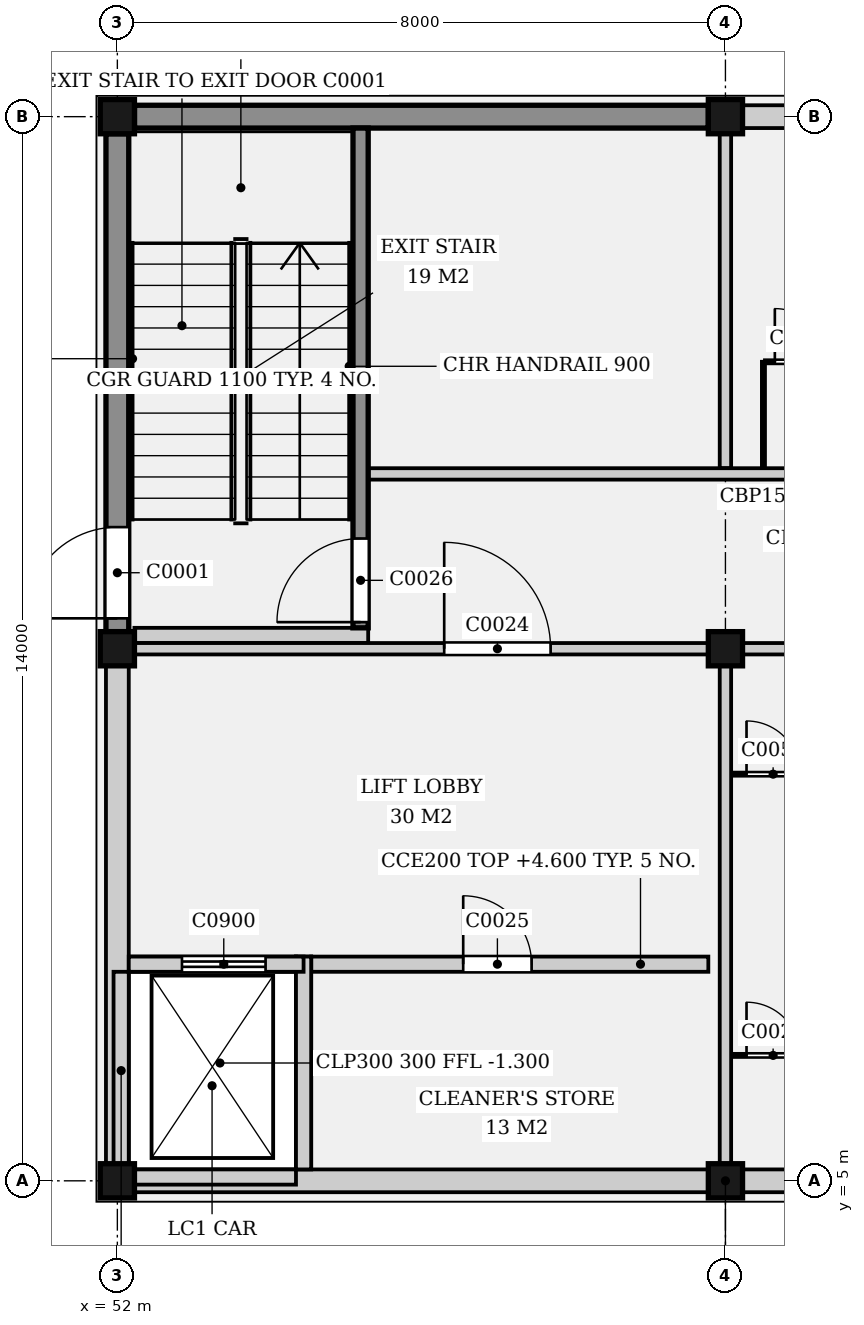
"""IFC4 building model, lengths in metres.
Left out: names, types, materials, properties, quantities, classifications, styles, units other than length and angle.
Written with IfcOpenShell. Run it as: python <this file> out.ifc"""

import sys

from ifc_helpers import new_model, si_unit, direction, frame, frame_2d, origin, origin_2d, place, context, subcontext, project, spatial, rectangle, extrude, element, fill, save


model = new_model("IFC4")
c1 = context("Model", 3, precision=1e-05, world=origin(), true_north=direction((0.0, 1.0)))
c2 = subcontext(c1, "Body", "Model", "MODEL_VIEW")
j1 = project(units=[si_unit("LENGTHUNIT", "METRE"), si_unit("PLANEANGLEUNIT", "RADIAN")], contexts=[c1])
p1 = place(None, origin())
s1 = spatial("IfcSite", under=j1, at=p1, CompositionType="ELEMENT")
p2 = place(p1, origin())
s2 = spatial("IfcBuilding", under=s1, at=p2, CompositionType="ELEMENT")
p3 = place(p2, origin())
s3 = spatial("IfcBuildingStorey", under=s2, at=p3, CompositionType="ELEMENT", Elevation=0.0)
for number, where, z_axis, x_axis in (
    (1, (52.0, 5.0, -0.25), (0.0, 0.0, 1.0), (1.0, 0.0, 0.0)),
    (2, (52.0, 12.0, -0.25), (0.0, 0.0, 1.0), (1.0, 0.0, 0.0)),
    (3, (52.0, 19.0, -0.25), (0.0, 0.0, 1.0), (1.0, 0.0, 0.0)),
    (4, (60.0, 5.0, -0.25), (0.0, 0.0, 1.0), (1.0, 0.0, 0.0)),
    (5, (60.0, 12.0, -0.25), (0.0, 0.0, 1.0), (1.0, 0.0, 0.0)),
    (6, (60.0, 19.0, -0.25), (0.0, 0.0, 1.0), (1.0, 0.0, 0.0)),
):
    element("IfcColumn", number, at=place(p3, frame(where, z_axis=z_axis, x_axis=x_axis)), inside=s3, PredefinedType="COLUMN", context=c2, shape_type="SweptSolid", body=[
        extrude(rectangle(XDim=0.45, YDim=0.45, at=origin_2d()), origin(), (0.0, 0.0, 1.0), 5.25),
    ])
p4 = place(p3, frame((52.225, 5.0, 0.0), z_axis=(0.0, 0.0, 1.0), x_axis=(1.0, 0.0, 0.0)))
e7 = element("IfcWall", 7, at=p4, inside=s3, PredefinedType="ELEMENTEDWALL", context=c2, shape_type="SweptSolid", body=[
    extrude(rectangle(XDim=7.55, YDim=0.3, at=frame_2d((3.775, 0.0))), origin(), (0.0, 0.0, 1.0), 4.6),
])
p5 = place(p3, frame((60.225, 5.0, 0.0), z_axis=(0.0, 0.0, 1.0), x_axis=(1.0, 0.0, 0.0)))
e8 = element("IfcWall", 8, at=p5, inside=s3, PredefinedType="ELEMENTEDWALL", context=c2, shape_type="SweptSolid", body=[
    extrude(rectangle(XDim=11.55, YDim=0.3, at=frame_2d((5.775, 0.0))), origin(), (0.0, 0.0, 1.0), 4.6),
])
p6 = place(p5, frame((1.458, 0.0, 2.5)))
e9 = element("IfcOpeningElement", 9, at=p6, cuts=e8, PredefinedType="OPENING", context=c2, shape_type="SweptSolid", body=[
    extrude(rectangle(XDim=1.6, YDim=1.0, at=frame_2d((0.8, 0.5))), frame((0.0, 0.16, 0.0), z_axis=(0.0, -1.0, 0.0), x_axis=(1.0, 0.0, 0.0)), (0.0, 0.0, 1.0), 0.32),
])
p7 = place(p5, frame((4.975, 0.0, 2.5)))
e10 = element("IfcOpeningElement", 10, at=p7, cuts=e8, PredefinedType="OPENING", context=c2, shape_type="SweptSolid", body=[
    extrude(rectangle(XDim=1.6, YDim=1.0, at=frame_2d((0.8, 0.5))), frame((0.0, 0.16, 0.0), z_axis=(0.0, -1.0, 0.0), x_axis=(1.0, 0.0, 0.0)), (0.0, 0.0, 1.0), 0.32),
])
p8 = place(p5, frame((8.492, 0.0, 2.5)))
e11 = element("IfcOpeningElement", 11, at=p8, cuts=e8, PredefinedType="OPENING", context=c2, shape_type="SweptSolid", body=[
    extrude(rectangle(XDim=1.6, YDim=1.0, at=frame_2d((0.8, 0.5))), frame((0.0, 0.16, 0.0), z_axis=(0.0, -1.0, 0.0), x_axis=(1.0, 0.0, 0.0)), (0.0, 0.0, 1.0), 0.32),
])
p9 = place(p3, frame((52.225, 19.0, 0.0), z_axis=(0.0, 0.0, 1.0), x_axis=(1.0, 0.0, 0.0)))
e12 = element("IfcWall", 12, at=p9, inside=s3, PredefinedType="ELEMENTEDWALL", context=c2, shape_type="SweptSolid", body=[
    extrude(rectangle(XDim=7.55, YDim=0.3, at=frame_2d((3.775, 0.0))), origin(), (0.0, 0.0, 1.0), 4.6),
])
p10 = place(p3, frame((60.225, 19.0, 0.0), z_axis=(0.0, 0.0, 1.0), x_axis=(1.0, 0.0, 0.0)))
e13 = element("IfcWall", 13, at=p10, inside=s3, PredefinedType="ELEMENTEDWALL", context=c2, shape_type="SweptSolid", body=[
    extrude(rectangle(XDim=11.55, YDim=0.3, at=frame_2d((5.775, 0.0))), origin(), (0.0, 0.0, 1.0), 4.6),
])
p11 = place(p10, frame((1.458, 0.0, 2.5)))
e14 = element("IfcOpeningElement", 14, at=p11, cuts=e13, PredefinedType="OPENING", context=c2, shape_type="SweptSolid", body=[
    extrude(rectangle(XDim=1.6, YDim=1.0, at=frame_2d((0.8, 0.5))), frame((0.0, 0.16, 0.0), z_axis=(0.0, -1.0, 0.0), x_axis=(1.0, 0.0, 0.0)), (0.0, 0.0, 1.0), 0.32),
])
p12 = place(p10, frame((4.975, 0.0, 2.5)))
e15 = element("IfcOpeningElement", 15, at=p12, cuts=e13, PredefinedType="OPENING", context=c2, shape_type="SweptSolid", body=[
    extrude(rectangle(XDim=1.6, YDim=1.0, at=frame_2d((0.8, 0.5))), frame((0.0, 0.16, 0.0), z_axis=(0.0, -1.0, 0.0), x_axis=(1.0, 0.0, 0.0)), (0.0, 0.0, 1.0), 0.32),
])
p13 = place(p10, frame((8.492, 0.0, 2.5)))
e16 = element("IfcOpeningElement", 16, at=p13, cuts=e13, PredefinedType="OPENING", context=c2, shape_type="SweptSolid", body=[
    extrude(rectangle(XDim=1.6, YDim=1.0, at=frame_2d((0.8, 0.5))), frame((0.0, 0.16, 0.0), z_axis=(0.0, -1.0, 0.0), x_axis=(1.0, 0.0, 0.0)), (0.0, 0.0, 1.0), 0.32),
])
p14 = place(p3, frame((52.0, 5.225, 0.0), z_axis=(0.0, 0.0, 1.0), x_axis=(0.0, 1.0, 0.0)))
e17 = element("IfcWall", 17, at=p14, inside=s3, PredefinedType="ELEMENTEDWALL", context=c2, shape_type="SweptSolid", body=[
    extrude(rectangle(XDim=6.55, YDim=0.3, at=frame_2d((3.275, 0.0))), origin(), (0.0, 0.0, 1.0), 4.6),
])
p15 = place(p3, frame((52.0, 12.225, 0.0), z_axis=(0.0, 0.0, 1.0), x_axis=(0.0, 1.0, 0.0)))
e18 = element("IfcWall", 18, at=p15, inside=s3, PredefinedType="ELEMENTEDWALL", context=c2, shape_type="SweptSolid", body=[
    extrude(rectangle(XDim=6.55, YDim=0.3, at=frame_2d((3.275, 0.0))), origin(), (0.0, 0.0, 1.0), 4.6),
])
p16 = place(p15, frame((0.175, 0.0, 0.0)))
e19 = element("IfcOpeningElement", 19, at=p16, cuts=e18, PredefinedType="OPENING", context=c2, shape_type="SweptSolid", body=[
    extrude(rectangle(XDim=1.2, YDim=2.1, at=frame_2d((0.6, 1.05))), frame((0.0, 0.16, 0.0), z_axis=(0.0, -1.0, 0.0), x_axis=(1.0, 0.0, 0.0)), (0.0, 0.0, 1.0), 0.32),
])
p17 = place(p3, frame((52.15, 7.85, -1.3), z_axis=(0.0, 0.0, 1.0), x_axis=(1.0, 0.0, 0.0)))
e20 = element("IfcWall", 20, at=p17, inside=s3, PredefinedType="SOLIDWALL", context=c2, shape_type="SweptSolid", body=[
    extrude(rectangle(XDim=2.3, YDim=0.2, at=frame_2d((1.15, 0.0))), origin(), (0.0, 0.0, 1.0), 1.3),
])
p18 = place(p3, frame((54.45, 5.15, -1.3), z_axis=(0.0, 0.0, 1.0), x_axis=(0.0, 1.0, 0.0)))
e21 = element("IfcWall", 21, at=p18, inside=s3, PredefinedType="SOLIDWALL", context=c2, shape_type="SweptSolid", body=[
    extrude(rectangle(XDim=2.8, YDim=0.2, at=frame_2d((1.4, 0.0))), origin(), (0.0, 0.0, 1.0), 1.3),
])
p19 = place(p3, frame((52.05, 5.15, -1.3), z_axis=(0.0, 0.0, 1.0), x_axis=(0.0, 1.0, 0.0)))
e22 = element("IfcWall", 22, at=p19, inside=s3, PredefinedType="SOLIDWALL", context=c2, shape_type="SweptSolid", body=[
    extrude(rectangle(XDim=2.6, YDim=0.2, at=frame_2d((1.3, 0.0))), origin(), (0.0, 0.0, 1.0), 1.3),
])
p20 = place(p3, frame((52.15, 5.05, -1.3), z_axis=(0.0, 0.0, 1.0), x_axis=(1.0, 0.0, 0.0)))
e23 = element("IfcWall", 23, at=p20, inside=s3, PredefinedType="SOLIDWALL", context=c2, shape_type="SweptSolid", body=[
    extrude(rectangle(XDim=2.2, YDim=0.2, at=frame_2d((1.1, 0.0))), origin(), (0.0, 0.0, 1.0), 1.3),
])
p21 = place(p3, frame((54.45, 5.15, 0.0), z_axis=(0.0, 0.0, 1.0), x_axis=(0.0, 1.0, 0.0)))
e24 = element("IfcWall", 24, at=p21, inside=s3, PredefinedType="SOLIDWALL", context=c2, shape_type="SweptSolid", body=[
    extrude(rectangle(XDim=2.8, YDim=0.2, at=frame_2d((1.4, 0.0))), origin(), (0.0, 0.0, 1.0), 4.6),
])
p22 = place(p3, frame((52.15, 7.85, 0.0), z_axis=(0.0, 0.0, 1.0), x_axis=(1.0, 0.0, 0.0)))
e25 = element("IfcWall", 25, at=p22, inside=s3, PredefinedType="SOLIDWALL", context=c2, shape_type="SweptSolid", body=[
    extrude(rectangle(XDim=2.2, YDim=0.2, at=frame_2d((1.1, 0.0))), origin(), (0.0, 0.0, 1.0), 4.6),
])
p23 = place(p22, frame((0.7, 0.0, 0.0)))
e26 = element("IfcOpeningElement", 26, at=p23, cuts=e25, PredefinedType="OPENING", context=c2, shape_type="SweptSolid", body=[
    extrude(rectangle(XDim=1.1, YDim=2.1, at=frame_2d((0.55, 1.05))), frame((0.0, 0.11, 0.0), z_axis=(0.0, -1.0, 0.0), x_axis=(1.0, 0.0, 0.0)), (0.0, 0.0, 1.0), 0.22),
])
p24 = place(p3, frame((52.225, 12.0, 0.0), z_axis=(0.0, 0.0, 1.0), x_axis=(1.0, 0.0, 0.0)))
e27 = element("IfcWall", 27, at=p24, inside=s3, PredefinedType="PARTITIONING", context=c2, shape_type="SweptSolid", body=[
    extrude(rectangle(XDim=7.55, YDim=0.15, at=frame_2d((3.775, 0.0))), origin(), (0.0, 0.0, 1.0), 4.6),
])
p25 = place(p24, frame((4.075, 0.0, 0.0)))
e28 = element("IfcOpeningElement", 28, at=p25, cuts=e27, PredefinedType="OPENING", context=c2, shape_type="SweptSolid", body=[
    extrude(rectangle(XDim=1.4, YDim=2.1, at=frame_2d((0.7, 1.05))), frame((0.0, 0.085, 0.0), z_axis=(0.0, -1.0, 0.0), x_axis=(1.0, 0.0, 0.0)), (0.0, 0.0, 1.0), 0.17),
])
p26 = place(p3, frame((60.225, 12.0, 0.0), z_axis=(0.0, 0.0, 1.0), x_axis=(1.0, 0.0, 0.0)))
e29 = element("IfcWall", 29, at=p26, inside=s3, PredefinedType="PARTITIONING", context=c2, shape_type="SweptSolid", body=[
    extrude(rectangle(XDim=11.55, YDim=0.15, at=frame_2d((5.775, 0.0))), origin(), (0.0, 0.0, 1.0), 4.6),
])
p27 = place(p3, frame((55.3, 14.3, 0.0), z_axis=(0.0, 0.0, 1.0), x_axis=(1.0, 0.0, 0.0)))
e30 = element("IfcWall", 30, at=p27, inside=s3, PredefinedType="PARTITIONING", context=c2, shape_type="SweptSolid", body=[
    extrude(rectangle(XDim=93.4, YDim=0.15, at=frame_2d((46.7, 0.0))), origin(), (0.0, 0.0, 1.0), 4.6),
])
p28 = place(p27, frame((15.8, 0.0, 0.0)))
e31 = element("IfcOpeningElement", 31, at=p28, cuts=e30, PredefinedType="OPENING", context=c2, shape_type="SweptSolid", body=[
    extrude(rectangle(XDim=1.8, YDim=2.4, at=frame_2d((0.9, 1.2))), frame((0.0, 0.085, 0.0), z_axis=(0.0, -1.0, 0.0), x_axis=(1.0, 0.0, 0.0)), (0.0, 0.0, 1.0), 0.17),
])
p29 = place(p27, frame((32.2, 0.0, 0.0)))
e32 = element("IfcOpeningElement", 32, at=p29, cuts=e30, PredefinedType="OPENING", context=c2, shape_type="SweptSolid", body=[
    extrude(rectangle(XDim=1.0, YDim=2.1, at=frame_2d((0.5, 1.05))), frame((0.0, 0.085, 0.0), z_axis=(0.0, -1.0, 0.0), x_axis=(1.0, 0.0, 0.0)), (0.0, 0.0, 1.0), 0.17),
])
p30 = place(p27, frame((38.2, 0.0, 0.0)))
e33 = element("IfcOpeningElement", 33, at=p30, cuts=e30, PredefinedType="OPENING", context=c2, shape_type="SweptSolid", body=[
    extrude(rectangle(XDim=1.0, YDim=2.1, at=frame_2d((0.5, 1.05))), frame((0.0, 0.085, 0.0), z_axis=(0.0, -1.0, 0.0), x_axis=(1.0, 0.0, 0.0)), (0.0, 0.0, 1.0), 0.17),
])
p31 = place(p27, frame((43.2, 0.0, 0.0)))
e34 = element("IfcOpeningElement", 34, at=p31, cuts=e30, PredefinedType="OPENING", context=c2, shape_type="SweptSolid", body=[
    extrude(rectangle(XDim=1.0, YDim=2.1, at=frame_2d((0.5, 1.05))), frame((0.0, 0.085, 0.0), z_axis=(0.0, -1.0, 0.0), x_axis=(1.0, 0.0, 0.0)), (0.0, 0.0, 1.0), 0.17),
])
p32 = place(p27, frame((49.2, 0.0, 0.0)))
e35 = element("IfcOpeningElement", 35, at=p32, cuts=e30, PredefinedType="OPENING", context=c2, shape_type="SweptSolid", body=[
    extrude(rectangle(XDim=1.0, YDim=2.1, at=frame_2d((0.5, 1.05))), frame((0.0, 0.085, 0.0), z_axis=(0.0, -1.0, 0.0), x_axis=(1.0, 0.0, 0.0)), (0.0, 0.0, 1.0), 0.17),
])
p33 = place(p27, frame((57.8, 0.0, 0.0)))
e36 = element("IfcOpeningElement", 36, at=p33, cuts=e30, PredefinedType="OPENING", context=c2, shape_type="SweptSolid", body=[
    extrude(rectangle(XDim=1.8, YDim=2.4, at=frame_2d((0.9, 1.2))), frame((0.0, 0.085, 0.0), z_axis=(0.0, -1.0, 0.0), x_axis=(1.0, 0.0, 0.0)), (0.0, 0.0, 1.0), 0.17),
])
p34 = place(p27, frame((69.8, 0.0, 0.0)))
e37 = element("IfcOpeningElement", 37, at=p34, cuts=e30, PredefinedType="OPENING", context=c2, shape_type="SweptSolid", body=[
    extrude(rectangle(XDim=1.8, YDim=2.4, at=frame_2d((0.9, 1.2))), frame((0.0, 0.085, 0.0), z_axis=(0.0, -1.0, 0.0), x_axis=(1.0, 0.0, 0.0)), (0.0, 0.0, 1.0), 0.17),
])
p35 = place(p27, frame((82.2, 0.0, 0.0)))
e38 = element("IfcOpeningElement", 38, at=p35, cuts=e30, PredefinedType="OPENING", context=c2, shape_type="SweptSolid", body=[
    extrude(rectangle(XDim=1.0, YDim=2.1, at=frame_2d((0.5, 1.05))), frame((0.0, 0.085, 0.0), z_axis=(0.0, -1.0, 0.0), x_axis=(1.0, 0.0, 0.0)), (0.0, 0.0, 1.0), 0.17),
])
p36 = place(p3, frame((60.0, 5.225, 0.0), z_axis=(0.0, 0.0, 1.0), x_axis=(0.0, 1.0, 0.0)))
e39 = element("IfcWall", 39, at=p36, inside=s3, PredefinedType="PARTITIONING", context=c2, shape_type="SweptSolid", body=[
    extrude(rectangle(XDim=6.55, YDim=0.15, at=frame_2d((3.275, 0.0))), origin(), (0.0, 0.0, 1.0), 4.6),
])
p37 = place(p3, frame((60.0, 14.375, 0.0), z_axis=(0.0, 0.0, 1.0), x_axis=(0.0, 1.0, 0.0)))
e40 = element("IfcWall", 40, at=p37, inside=s3, PredefinedType="PARTITIONING", context=c2, shape_type="SweptSolid", body=[
    extrude(rectangle(XDim=4.4, YDim=0.15, at=frame_2d((2.2, 0.0))), origin(), (0.0, 0.0, 1.0), 4.6),
])
p38 = place(p3, frame((54.55, 7.85, 0.0), z_axis=(0.0, 0.0, 1.0), x_axis=(1.0, 0.0, 0.0)))
e41 = element("IfcWall", 41, at=p38, inside=s3, PredefinedType="SOLIDWALL", context=c2, shape_type="SweptSolid", body=[
    extrude(rectangle(XDim=5.225, YDim=0.2, at=frame_2d((2.612, 0.0))), origin(), (0.0, 0.0, 1.0), 4.6),
])
p39 = place(p38, frame((2.0, 0.0, 0.0)))
e42 = element("IfcOpeningElement", 42, at=p39, cuts=e41, PredefinedType="OPENING", context=c2, shape_type="SweptSolid", body=[
    extrude(rectangle(XDim=0.9, YDim=2.1, at=frame_2d((0.45, 1.05))), frame((0.0, 0.11, 0.0), z_axis=(0.0, -1.0, 0.0), x_axis=(1.0, 0.0, 0.0)), (0.0, 0.0, 1.0), 0.22),
])
p40 = place(p3, frame((55.2, 12.275, 0.0), z_axis=(0.0, 0.0, 1.0), x_axis=(0.0, 1.0, 0.0)))
e43 = element("IfcWall", 43, at=p40, inside=s3, PredefinedType="SOLIDWALL", context=c2, shape_type="SweptSolid", body=[
    extrude(rectangle(XDim=6.575, YDim=0.2, at=frame_2d((3.288, 0.0))), origin(), (0.0, 0.0, 1.0), 4.6),
])
p41 = place(p40, frame((0.075, 0.0, 0.0)))
e44 = element("IfcOpeningElement", 44, at=p41, cuts=e43, PredefinedType="OPENING", context=c2, shape_type="SweptSolid", body=[
    extrude(rectangle(XDim=1.1, YDim=2.1, at=frame_2d((0.55, 1.05))), frame((0.0, 0.11, 0.0), z_axis=(0.0, -1.0, 0.0), x_axis=(1.0, 0.0, 0.0)), (0.0, 0.0, 1.0), 0.22),
])
p42 = place(p3, frame((52.225, 12.175, 0.0), z_axis=(0.0, 0.0, 1.0), x_axis=(1.0, 0.0, 0.0)))
e45 = element("IfcWall", 45, at=p42, inside=s3, PredefinedType="SOLIDWALL", context=c2, shape_type="SweptSolid", body=[
    extrude(rectangle(XDim=3.075, YDim=0.2, at=frame_2d((1.538, 0.0))), origin(), (0.0, 0.0, 1.0), 4.6),
])
p43 = place(p3, frame((60.075, 6.65, 0.0), z_axis=(0.0, 0.0, 1.0), x_axis=(1.0, 0.0, 0.0)))
e46 = element("IfcWall", 46, at=p43, inside=s3, PredefinedType="PARTITIONING", context=c2, shape_type="SweptSolid", body=[
    extrude(rectangle(XDim=1.105, YDim=0.04, at=frame_2d((0.552, 0.0))), origin(), (0.0, 0.0, 1.0), 2.4),
])
p44 = place(p43, frame((0.202, 0.0, 0.0)))
e47 = element("IfcOpeningElement", 47, at=p44, cuts=e46, PredefinedType="OPENING", context=c2, shape_type="SweptSolid", body=[
    extrude(rectangle(XDim=0.7, YDim=2.0, at=frame_2d((0.35, 1.0))), frame((0.0, 0.03, 0.0), z_axis=(0.0, -1.0, 0.0), x_axis=(1.0, 0.0, 0.0)), (0.0, 0.0, 1.0), 0.06),
])
p45 = place(p3, frame((60.075, 10.35, 0.0), z_axis=(0.0, 0.0, 1.0), x_axis=(1.0, 0.0, 0.0)))
e48 = element("IfcWall", 48, at=p45, inside=s3, PredefinedType="PARTITIONING", context=c2, shape_type="SweptSolid", body=[
    extrude(rectangle(XDim=1.105, YDim=0.04, at=frame_2d((0.552, 0.0))), origin(), (0.0, 0.0, 1.0), 2.4),
])
p46 = place(p45, frame((0.202, 0.0, 0.0)))
e49 = element("IfcOpeningElement", 49, at=p46, cuts=e48, PredefinedType="OPENING", context=c2, shape_type="SweptSolid", body=[
    extrude(rectangle(XDim=0.7, YDim=2.0, at=frame_2d((0.35, 1.0))), frame((0.0, 0.03, 0.0), z_axis=(0.0, -1.0, 0.0), x_axis=(1.0, 0.0, 0.0)), (0.0, 0.0, 1.0), 0.06),
])
p47 = place(p3, frame((60.5, 14.375, 0.0), z_axis=(0.0, 0.0, 1.0), x_axis=(0.0, 1.0, 0.0)))
e50 = element("IfcWall", 50, at=p47, inside=s3, PredefinedType="PARTITIONING", context=c2, shape_type="SweptSolid", body=[
    extrude(rectangle(XDim=1.4, YDim=0.04, at=frame_2d((0.7, 0.0))), origin(), (0.0, 0.0, 1.0), 2.4),
])
p48 = place(p3, frame((60.52, 15.775, 0.0), z_axis=(0.0, 0.0, 1.0), x_axis=(1.0, 0.0, 0.0)))
e51 = element("IfcWall", 51, at=p48, inside=s3, PredefinedType="PARTITIONING", context=c2, shape_type="SweptSolid", body=[
    extrude(rectangle(XDim=0.96, YDim=0.04, at=frame_2d((0.48, 0.0))), origin(), (0.0, 0.0, 1.0), 2.4),
])
p49 = place(p48, frame((0.13, 0.0, 0.0)))
e52 = element("IfcOpeningElement", 52, at=p49, cuts=e51, PredefinedType="OPENING", context=c2, shape_type="SweptSolid", body=[
    extrude(rectangle(XDim=0.7, YDim=2.0, at=frame_2d((0.35, 1.0))), frame((0.0, 0.03, 0.0), z_axis=(0.0, -1.0, 0.0), x_axis=(1.0, 0.0, 0.0)), (0.0, 0.0, 1.0), 0.06),
])
p50 = place(p16, origin())
e53 = element("IfcDoor", 53, at=p50, inside=s3, OperationType="SINGLE_SWING_LEFT", PredefinedType="DOOR", context=c2, shape_type="SweptSolid", body=[
    extrude(rectangle(XDim=1.2, YDim=2.1, at=frame_2d((0.6, 1.05))), frame((0.0, 0.025, 0.0), z_axis=(0.0, -1.0, 0.0), x_axis=(1.0, 0.0, 0.0)), (0.0, 0.0, 1.0), 0.05),
])
fill(e19, e53)
p51 = place(p23, origin())
e54 = element("IfcDoor", 54, at=p51, inside=s3, OperationType="SLIDING_TO_LEFT", PredefinedType="DOOR", context=c2, shape_type="SweptSolid", body=[
    extrude(rectangle(XDim=1.1, YDim=2.1, at=frame_2d((0.55, 1.05))), frame((0.0, 0.025, 0.0), z_axis=(0.0, -1.0, 0.0), x_axis=(1.0, 0.0, 0.0)), (0.0, 0.0, 1.0), 0.05),
])
fill(e26, e54)
p52 = place(p25, origin())
e55 = element("IfcDoor", 55, at=p52, inside=s3, OperationType="SINGLE_SWING_LEFT", PredefinedType="DOOR", context=c2, shape_type="SweptSolid", body=[
    extrude(rectangle(XDim=1.4, YDim=2.1, at=frame_2d((0.7, 1.05))), frame((0.0, 0.025, 0.0), z_axis=(0.0, -1.0, 0.0), x_axis=(1.0, 0.0, 0.0)), (0.0, 0.0, 1.0), 0.05),
])
fill(e28, e55)
p53 = place(p39, origin())
e56 = element("IfcDoor", 56, at=p53, inside=s3, OperationType="SINGLE_SWING_LEFT", PredefinedType="DOOR", context=c2, shape_type="SweptSolid", body=[
    extrude(rectangle(XDim=0.9, YDim=2.1, at=frame_2d((0.45, 1.05))), frame((0.0, 0.025, 0.0), z_axis=(0.0, -1.0, 0.0), x_axis=(1.0, 0.0, 0.0)), (0.0, 0.0, 1.0), 0.05),
])
fill(e42, e56)
p54 = place(p41, origin())
e57 = element("IfcDoor", 57, at=p54, inside=s3, OperationType="SINGLE_SWING_LEFT", PredefinedType="DOOR", context=c2, shape_type="SweptSolid", body=[
    extrude(rectangle(XDim=1.1, YDim=2.1, at=frame_2d((0.55, 1.05))), frame((0.0, 0.025, 0.0), z_axis=(0.0, -1.0, 0.0), x_axis=(1.0, 0.0, 0.0)), (0.0, 0.0, 1.0), 0.05),
])
fill(e44, e57)
p55 = place(p44, origin())
e58 = element("IfcDoor", 58, at=p55, inside=s3, OperationType="SINGLE_SWING_LEFT", PredefinedType="DOOR", context=c2, shape_type="SweptSolid", body=[
    extrude(rectangle(XDim=0.7, YDim=2.0, at=frame_2d((0.35, 1.0))), frame((0.0, 0.02, 0.0), z_axis=(0.0, -1.0, 0.0), x_axis=(1.0, 0.0, 0.0)), (0.0, 0.0, 1.0), 0.04),
])
fill(e47, e58)
p56 = place(p46, origin())
e59 = element("IfcDoor", 59, at=p56, inside=s3, OperationType="SINGLE_SWING_LEFT", PredefinedType="DOOR", context=c2, shape_type="SweptSolid", body=[
    extrude(rectangle(XDim=0.7, YDim=2.0, at=frame_2d((0.35, 1.0))), frame((0.0, 0.02, 0.0), z_axis=(0.0, -1.0, 0.0), x_axis=(1.0, 0.0, 0.0)), (0.0, 0.0, 1.0), 0.04),
])
fill(e49, e59)
p57 = place(p49, origin())
e60 = element("IfcDoor", 60, at=p57, inside=s3, OperationType="SINGLE_SWING_LEFT", PredefinedType="DOOR", context=c2, shape_type="SweptSolid", body=[
    extrude(rectangle(XDim=0.7, YDim=2.0, at=frame_2d((0.35, 1.0))), frame((0.0, 0.02, 0.0), z_axis=(0.0, -1.0, 0.0), x_axis=(1.0, 0.0, 0.0)), (0.0, 0.0, 1.0), 0.04),
])
fill(e52, e60)
save(model, sys.argv[1])
